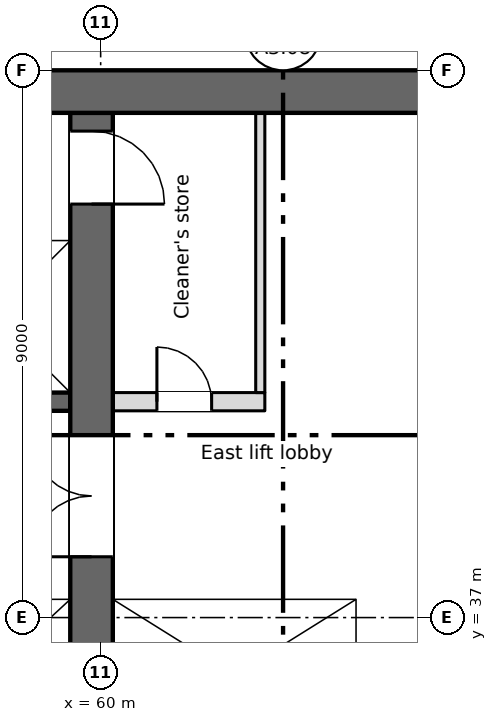
"""IFC4 building model, lengths in metres.
Left out: names, types, materials, properties, quantities, classifications, styles, units other than length and angle.
Written with IfcOpenShell. Run it as: python <this file> out.ifc"""

import sys

from ifc_helpers import new_model, si_unit, direction, frame, frame_2d, origin, place, context, subcontext, project, spatial, rectangle, extrude, element, fill, save


model = new_model("IFC4")
c1 = context("Model", 3, precision=1e-05, world=origin(), true_north=direction((0.0, 1.0)))
c2 = subcontext(c1, "Body", "Model", "MODEL_VIEW")
j1 = project(units=[si_unit("LENGTHUNIT", "METRE"), si_unit("PLANEANGLEUNIT", "RADIAN")], contexts=[c1])
p1 = place(None, origin())
s1 = spatial("IfcSite", under=j1, at=p1, CompositionType="ELEMENT")
p2 = place(p1, origin())
s2 = spatial("IfcBuilding", under=s1, at=p2, CompositionType="ELEMENT")
p3 = place(p2, frame((0.0, 0.0, 204.25)))
s3 = spatial("IfcBuildingStorey", under=s2, at=p3, CompositionType="ELEMENT", Elevation=204.25)
p4 = place(p3, frame((11.55, 45.65, 0.0), z_axis=(0.0, 0.0, 1.0), x_axis=(1.0, 0.0, 0.0)))
e1 = element("IfcWall", 1, at=p4, inside=s3, PredefinedType="SHEAR", context=c2, shape_type="SweptSolid", body=[
    extrude(rectangle(XDim=54.9, YDim=0.7, at=frame_2d((27.45, 0.0))), origin(), (0.0, 0.0, 1.0), 3.35),
])
p5 = place(p3, frame((64.35, 34.8, 0.0), z_axis=(0.0, 0.0, 1.0), x_axis=(0.0, 1.0, 0.0)))
e2 = element("IfcWall", 2, at=p5, inside=s3, PredefinedType="SHEAR", context=c2, shape_type="SweptSolid", body=[
    extrude(rectangle(XDim=10.5, YDim=0.3, at=frame_2d((5.25, 0.0))), origin(), (0.0, 0.0, 1.0), 3.35),
])
p6 = place(p3, frame((59.85, 28.4, 0.0), z_axis=(0.0, 0.0, 1.0), x_axis=(0.0, 1.0, 0.0)))
e3 = element("IfcWall", 3, at=p6, inside=s3, PredefinedType="SHEAR", context=c2, shape_type="SweptSolid", body=[
    extrude(rectangle(XDim=16.9, YDim=0.7, at=frame_2d((8.45, 0.0))), origin(), (0.0, 0.0, 1.0), 3.35),
])
p7 = place(p6, frame((9.6, 0.0, 0.0)))
e4 = element("IfcOpeningElement", 4, at=p7, cuts=e3, PredefinedType="OPENING", context=c2, shape_type="SweptSolid", body=[
    extrude(rectangle(XDim=2.0, YDim=2.1, at=frame_2d((1.0, 1.05))), frame((0.0, 0.36, 0.0), z_axis=(0.0, -1.0, 0.0), x_axis=(1.0, 0.0, 0.0)), (0.0, 0.0, 1.0), 0.72),
])
p8 = place(p6, frame((15.4, 0.0, 0.0)))
e5 = element("IfcOpeningElement", 5, at=p8, cuts=e3, PredefinedType="OPENING", context=c2, shape_type="SweptSolid", body=[
    extrude(rectangle(XDim=1.2, YDim=2.1, at=frame_2d((0.6, 1.05))), frame((0.0, 0.36, 0.0), z_axis=(0.0, -1.0, 0.0), x_axis=(1.0, 0.0, 0.0)), (0.0, 0.0, 1.0), 0.72),
])
p9 = place(p3, frame((47.3, 37.45, 0.0), z_axis=(0.0, 0.0, 1.0), x_axis=(1.0, 0.0, 0.0)))
e6 = element("IfcWall", 6, at=p9, inside=s3, PredefinedType="SHEAR", context=c2, shape_type="SweptSolid", body=[
    extrude(rectangle(XDim=12.2, YDim=0.3, at=frame_2d((6.1, 0.0))), origin(), (0.0, 0.0, 1.0), 3.35),
])
p10 = place(p9, frame((4.3, 0.0, 0.0)))
e7 = element("IfcOpeningElement", 7, at=p10, cuts=e6, PredefinedType="OPENING", context=c2, shape_type="SweptSolid", body=[
    extrude(rectangle(XDim=1.1, YDim=2.1, at=frame_2d((0.55, 1.05))), frame((0.0, 0.16, 0.0), z_axis=(0.0, -1.0, 0.0), x_axis=(1.0, 0.0, 0.0)), (0.0, 0.0, 1.0), 0.32),
])
p11 = place(p9, frame((7.3, 0.0, 0.0)))
e8 = element("IfcOpeningElement", 8, at=p11, cuts=e6, PredefinedType="OPENING", context=c2, shape_type="SweptSolid", body=[
    extrude(rectangle(XDim=1.1, YDim=2.1, at=frame_2d((0.55, 1.05))), frame((0.0, 0.16, 0.0), z_axis=(0.0, -1.0, 0.0), x_axis=(1.0, 0.0, 0.0)), (0.0, 0.0, 1.0), 0.32),
])
p12 = place(p9, frame((10.3, 0.0, 0.0)))
e9 = element("IfcOpeningElement", 9, at=p12, cuts=e6, PredefinedType="OPENING", context=c2, shape_type="SweptSolid", body=[
    extrude(rectangle(XDim=1.1, YDim=2.1, at=frame_2d((0.55, 1.05))), frame((0.0, 0.16, 0.0), z_axis=(0.0, -1.0, 0.0), x_axis=(1.0, 0.0, 0.0)), (0.0, 0.0, 1.0), 0.32),
])
p13 = place(p3, frame((60.2, 37.45, 0.0), z_axis=(0.0, 0.0, 1.0), x_axis=(1.0, 0.0, 0.0)))
e10 = element("IfcWall", 10, at=p13, inside=s3, PredefinedType="SHEAR", context=c2, shape_type="SweptSolid", body=[
    extrude(rectangle(XDim=4.0, YDim=0.3, at=frame_2d((2.0, 0.0))), origin(), (0.0, 0.0, 1.0), 3.35),
])
p14 = place(p13, frame((1.45, 0.0, 0.0)))
e11 = element("IfcOpeningElement", 11, at=p14, cuts=e10, PredefinedType="OPENING", context=c2, shape_type="SweptSolid", body=[
    extrude(rectangle(XDim=1.1, YDim=2.1, at=frame_2d((0.55, 1.05))), frame((0.0, 0.16, 0.0), z_axis=(0.0, -1.0, 0.0), x_axis=(1.0, 0.0, 0.0)), (0.0, 0.0, 1.0), 0.32),
])
p15 = place(p3, frame((18.5, 40.55, 0.0), z_axis=(0.0, 0.0, 1.0), x_axis=(1.0, 0.0, 0.0)))
e12 = element("IfcWall", 12, at=p15, inside=s3, PredefinedType="SHEAR", context=c2, shape_type="SweptSolid", body=[
    extrude(rectangle(XDim=41.0, YDim=0.3, at=frame_2d((20.5, 0.0))), origin(), (0.0, 0.0, 1.0), 3.35),
])
p16 = place(p15, frame((2.15, 0.0, 0.0)))
e13 = element("IfcOpeningElement", 13, at=p16, cuts=e12, PredefinedType="OPENING", context=c2, shape_type="SweptSolid", body=[
    extrude(rectangle(XDim=0.9, YDim=2.1, at=frame_2d((0.45, 1.05))), frame((0.0, 0.16, 0.0), z_axis=(0.0, -1.0, 0.0), x_axis=(1.0, 0.0, 0.0)), (0.0, 0.0, 1.0), 0.32),
])
p17 = place(p15, frame((15.9, 0.0, 0.0)))
e14 = element("IfcOpeningElement", 14, at=p17, cuts=e12, PredefinedType="OPENING", context=c2, shape_type="SweptSolid", body=[
    extrude(rectangle(XDim=0.9, YDim=2.1, at=frame_2d((0.45, 1.05))), frame((0.0, 0.16, 0.0), z_axis=(0.0, -1.0, 0.0), x_axis=(1.0, 0.0, 0.0)), (0.0, 0.0, 1.0), 0.32),
])
p18 = place(p15, frame((21.4, 0.0, 0.0)))
e15 = element("IfcOpeningElement", 15, at=p18, cuts=e12, PredefinedType="OPENING", context=c2, shape_type="SweptSolid", body=[
    extrude(rectangle(XDim=0.9, YDim=2.1, at=frame_2d((0.45, 1.05))), frame((0.0, 0.16, 0.0), z_axis=(0.0, -1.0, 0.0), x_axis=(1.0, 0.0, 0.0)), (0.0, 0.0, 1.0), 0.32),
])
p19 = place(p15, frame((26.9, 0.0, 0.0)))
e16 = element("IfcOpeningElement", 16, at=p19, cuts=e12, PredefinedType="OPENING", context=c2, shape_type="SweptSolid", body=[
    extrude(rectangle(XDim=0.9, YDim=2.1, at=frame_2d((0.45, 1.05))), frame((0.0, 0.16, 0.0), z_axis=(0.0, -1.0, 0.0), x_axis=(1.0, 0.0, 0.0)), (0.0, 0.0, 1.0), 0.32),
])
p20 = place(p15, frame((6.175, 0.0, 0.0)))
e17 = element("IfcOpeningElement", 17, at=p20, cuts=e12, PredefinedType="OPENING", context=c2, shape_type="SweptSolid", body=[
    extrude(rectangle(XDim=1.1, YDim=2.1, at=frame_2d((0.55, 1.05))), frame((0.0, 0.16, 0.0), z_axis=(0.0, -1.0, 0.0), x_axis=(1.0, 0.0, 0.0)), (0.0, 0.0, 1.0), 0.32),
])
p21 = place(p15, frame((8.925, 0.0, 0.0)))
e18 = element("IfcOpeningElement", 18, at=p21, cuts=e12, PredefinedType="OPENING", context=c2, shape_type="SweptSolid", body=[
    extrude(rectangle(XDim=1.1, YDim=2.1, at=frame_2d((0.55, 1.05))), frame((0.0, 0.16, 0.0), z_axis=(0.0, -1.0, 0.0), x_axis=(1.0, 0.0, 0.0)), (0.0, 0.0, 1.0), 0.32),
])
p22 = place(p15, frame((11.675, 0.0, 0.0)))
e19 = element("IfcOpeningElement", 19, at=p22, cuts=e12, PredefinedType="OPENING", context=c2, shape_type="SweptSolid", body=[
    extrude(rectangle(XDim=1.1, YDim=2.1, at=frame_2d((0.55, 1.05))), frame((0.0, 0.16, 0.0), z_axis=(0.0, -1.0, 0.0), x_axis=(1.0, 0.0, 0.0)), (0.0, 0.0, 1.0), 0.32),
])
p23 = place(p15, frame((30.925, 0.0, 0.0)))
e20 = element("IfcOpeningElement", 20, at=p23, cuts=e12, PredefinedType="OPENING", context=c2, shape_type="SweptSolid", body=[
    extrude(rectangle(XDim=1.1, YDim=2.1, at=frame_2d((0.55, 1.05))), frame((0.0, 0.16, 0.0), z_axis=(0.0, -1.0, 0.0), x_axis=(1.0, 0.0, 0.0)), (0.0, 0.0, 1.0), 0.32),
])
p24 = place(p15, frame((33.675, 0.0, 0.0)))
e21 = element("IfcOpeningElement", 21, at=p24, cuts=e12, PredefinedType="OPENING", context=c2, shape_type="SweptSolid", body=[
    extrude(rectangle(XDim=1.1, YDim=2.1, at=frame_2d((0.55, 1.05))), frame((0.0, 0.16, 0.0), z_axis=(0.0, -1.0, 0.0), x_axis=(1.0, 0.0, 0.0)), (0.0, 0.0, 1.0), 0.32),
])
p25 = place(p15, frame((36.375, 0.0, 0.0)))
e22 = element("IfcOpeningElement", 22, at=p25, cuts=e12, PredefinedType="OPENING", context=c2, shape_type="SweptSolid", body=[
    extrude(rectangle(XDim=1.2, YDim=2.1, at=frame_2d((0.6, 1.05))), frame((0.0, 0.16, 0.0), z_axis=(0.0, -1.0, 0.0), x_axis=(1.0, 0.0, 0.0)), (0.0, 0.0, 1.0), 0.32),
])
p26 = place(p15, frame((39.15, 0.0, 0.0)))
e23 = element("IfcOpeningElement", 23, at=p26, cuts=e12, PredefinedType="OPENING", context=c2, shape_type="SweptSolid", body=[
    extrude(rectangle(XDim=1.2, YDim=2.1, at=frame_2d((0.6, 1.05))), frame((0.0, 0.16, 0.0), z_axis=(0.0, -1.0, 0.0), x_axis=(1.0, 0.0, 0.0)), (0.0, 0.0, 1.0), 0.32),
])
p27 = place(p3, frame((18.5, 43.35, 0.0), z_axis=(0.0, 0.0, 1.0), x_axis=(1.0, 0.0, 0.0)))
e24 = element("IfcWall", 24, at=p27, inside=s3, PredefinedType="SHEAR", context=c2, shape_type="SweptSolid", body=[
    extrude(rectangle(XDim=41.0, YDim=0.3, at=frame_2d((20.5, 0.0))), origin(), (0.0, 0.0, 1.0), 3.35),
])
p28 = place(p3, frame((60.2, 40.55, 0.0), z_axis=(0.0, 0.0, 1.0), x_axis=(1.0, 0.0, 0.0)))
e25 = element("IfcWall", 25, at=p28, inside=s3, PredefinedType="PARTITIONING", context=c2, shape_type="SweptSolid", body=[
    extrude(rectangle(XDim=2.5, YDim=0.3, at=frame_2d((1.25, 0.0))), origin(), (0.0, 0.0, 1.0), 3.35),
])
p29 = place(p28, frame((0.725, 0.0, 0.0)))
e26 = element("IfcOpeningElement", 26, at=p29, cuts=e25, PredefinedType="OPENING", context=c2, shape_type="SweptSolid", body=[
    extrude(rectangle(XDim=0.9, YDim=2.1, at=frame_2d((0.45, 1.05))), frame((0.0, 0.16, 0.0), z_axis=(0.0, -1.0, 0.0), x_axis=(1.0, 0.0, 0.0)), (0.0, 0.0, 1.0), 0.32),
])
p30 = place(p3, frame((62.625, 40.7, 0.0), z_axis=(0.0, 0.0, 1.0), x_axis=(0.0, 1.0, 0.0)))
e27 = element("IfcWall", 27, at=p30, inside=s3, PredefinedType="PARTITIONING", context=c2, shape_type="SweptSolid", body=[
    extrude(rectangle(XDim=4.6, YDim=0.15, at=frame_2d((2.3, 0.0))), origin(), (0.0, 0.0, 1.0), 3.35),
])
p31 = place(p29, origin())
e28 = element("IfcDoor", 28, at=p31, inside=s3, OperationType="SINGLE_SWING_LEFT", PredefinedType="DOOR", context=c2, shape_type="SweptSolid", body=[
    extrude(rectangle(XDim=0.9, YDim=2.1, at=frame_2d((0.45, 1.05))), frame((0.0, 0.025, 0.0), z_axis=(0.0, -1.0, 0.0), x_axis=(1.0, 0.0, 0.0)), (0.0, 0.0, 1.0), 0.05),
])
fill(e26, e28)
p32 = place(p14, origin())
e29 = element("IfcDoor", 29, at=p32, inside=s3, OperationType="SLIDING_TO_LEFT", PredefinedType="DOOR", context=c2, shape_type="SweptSolid", body=[
    extrude(rectangle(XDim=1.1, YDim=2.1, at=frame_2d((0.55, 1.05))), frame((0.0, 0.025, 0.0), z_axis=(0.0, -1.0, 0.0), x_axis=(1.0, 0.0, 0.0)), (0.0, 0.0, 1.0), 0.05),
])
fill(e11, e29)
p33 = place(p7, origin())
e30 = element("IfcDoor", 30, at=p33, inside=s3, OperationType="DOUBLE_DOOR_SINGLE_SWING", PredefinedType="DOOR", context=c2, shape_type="SweptSolid", body=[
    extrude(rectangle(XDim=2.0, YDim=2.1, at=frame_2d((1.0, 1.05))), frame((0.0, 0.025, 0.0), z_axis=(0.0, -1.0, 0.0), x_axis=(1.0, 0.0, 0.0)), (0.0, 0.0, 1.0), 0.05),
])
fill(e4, e30)
p34 = place(p8, origin())
e31 = element("IfcDoor", 31, at=p34, inside=s3, OperationType="SINGLE_SWING_LEFT", PredefinedType="DOOR", context=c2, shape_type="SweptSolid", body=[
    extrude(rectangle(XDim=1.2, YDim=2.1, at=frame_2d((0.6, 1.05))), frame((0.0, 0.025, 0.0), z_axis=(0.0, -1.0, 0.0), x_axis=(1.0, 0.0, 0.0)), (0.0, 0.0, 1.0), 0.05),
])
fill(e5, e31)
save(model, sys.argv[1])
